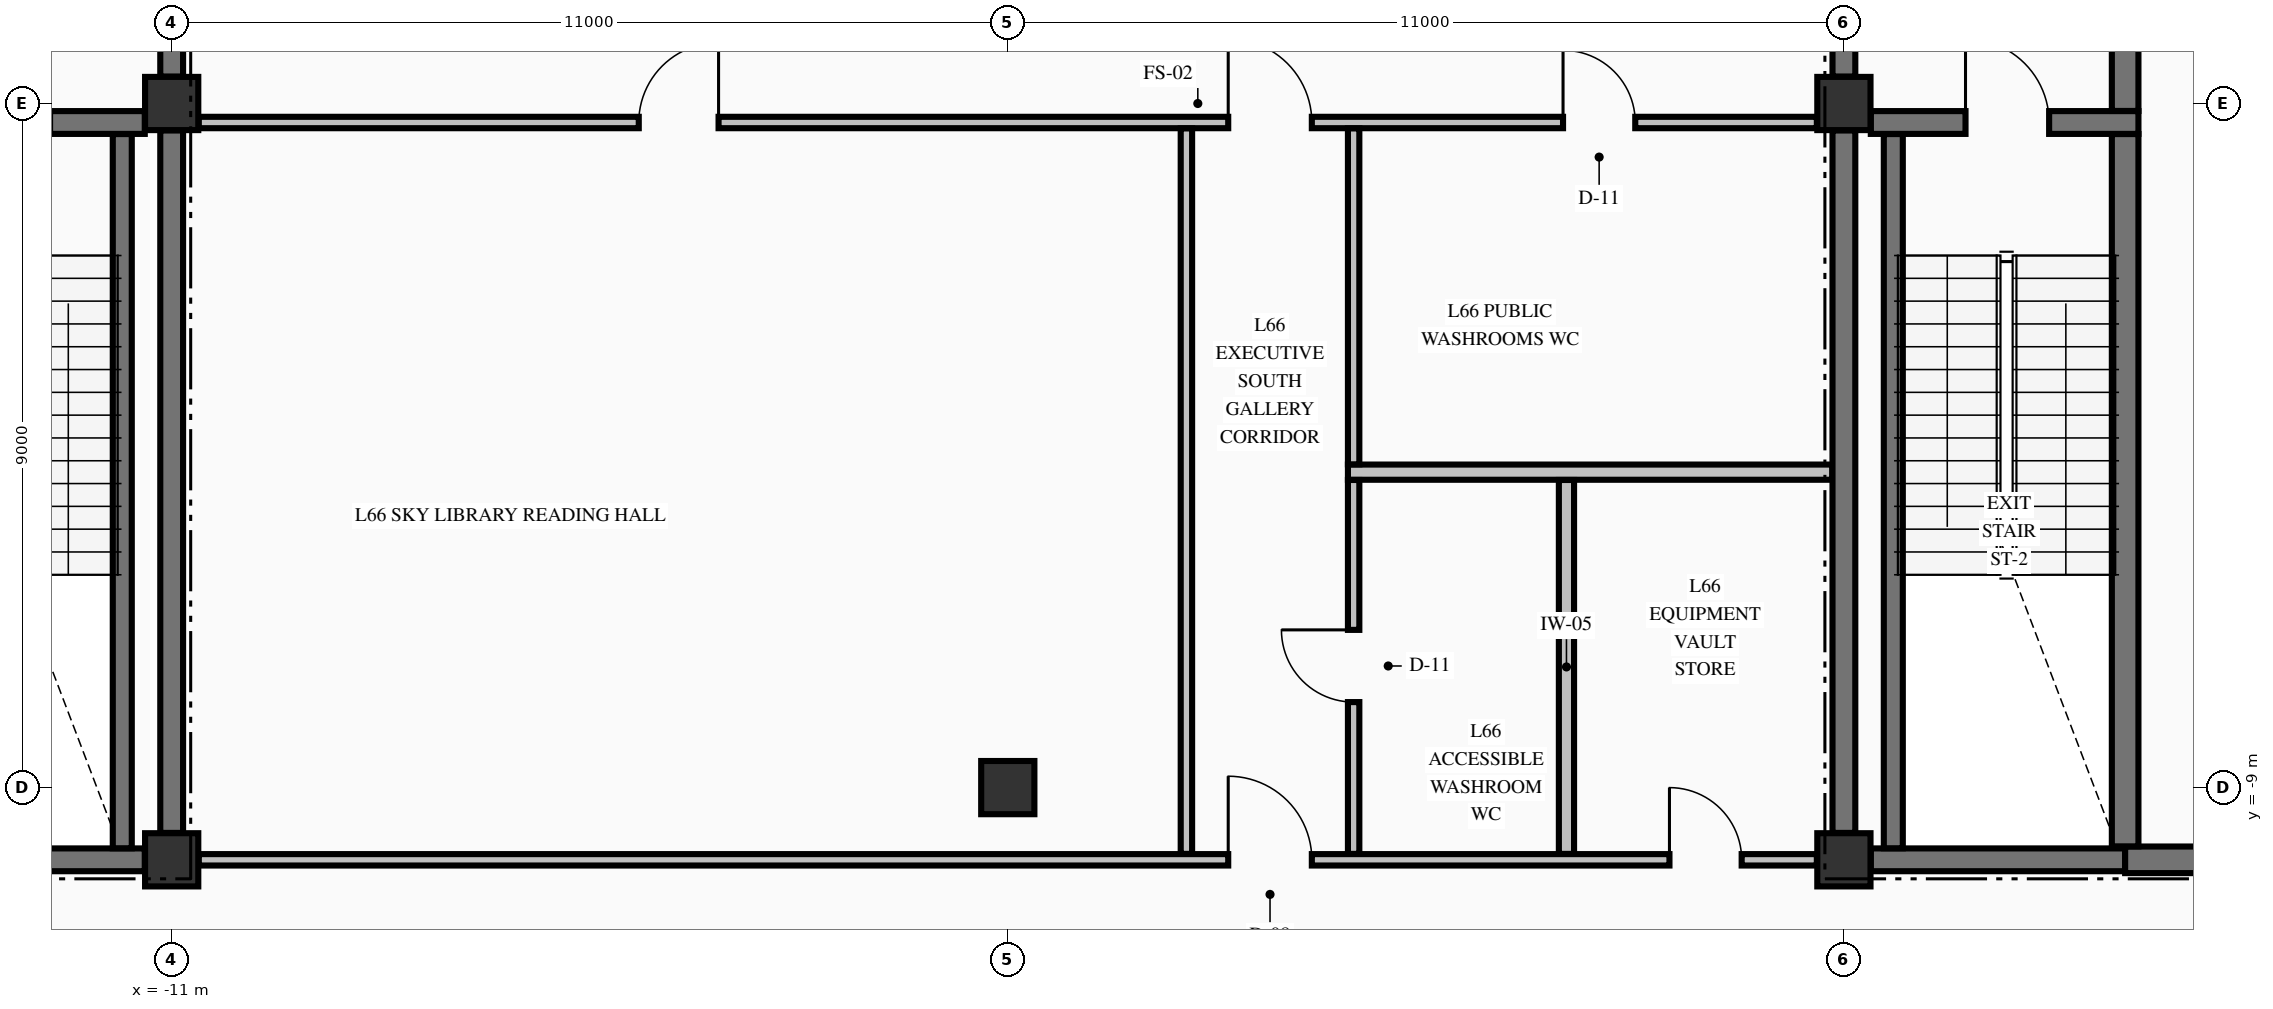
"""IFC4 building model, lengths in metres.
Left out: names, types, materials, properties, quantities, classifications, styles, units other than length and angle.
Written with IfcOpenShell. Run it as: python <this file> out.ifc"""

import sys

from ifc_helpers import new_model, si_unit, direction, frame, frame_2d, origin, origin_2d, place, context, subcontext, project, spatial, rectangle, extrude, element, fill, save


model = new_model("IFC4")
c1 = context("Model", 3, precision=1e-05, world=origin(), true_north=direction((0.0, 1.0)))
c2 = subcontext(c1, "Body", "Model", "MODEL_VIEW")
j1 = project(units=[si_unit("LENGTHUNIT", "METRE"), si_unit("PLANEANGLEUNIT", "RADIAN")], contexts=[c1])
p1 = place(None, origin())
s1 = spatial("IfcSite", under=j1, at=p1, CompositionType="ELEMENT")
p2 = place(p1, origin())
s2 = spatial("IfcBuilding", under=s1, at=p2, CompositionType="ELEMENT")
p3 = place(p2, frame((0.0, 0.0, 249.43)))
s3 = spatial("IfcBuildingStorey", under=s2, at=p3, CompositionType="ELEMENT", Elevation=249.43)
for number, where, z_axis, x_axis in (
    (1, (-11.0, -9.95, -0.425), (0.0, 0.0, 1.0), (1.0, 0.0, 0.0)),
    (2, (-11.0, 0.0, -0.425), (0.0, 0.0, 1.0), (1.0, 0.0, 0.0)),
    (3, (11.0, -9.95, -0.425), (0.0, 0.0, 1.0), (1.0, 0.0, 0.0)),
    (4, (11.0, 0.0, -0.425), (0.0, 0.0, 1.0), (1.0, 0.0, 0.0)),
    (5, (0.0, -9.0, -0.425), (0.0, 0.0, 1.0), (1.0, 0.0, 0.0)),
):
    element("IfcColumn", number, at=place(p3, frame(where, z_axis=z_axis, x_axis=x_axis)), inside=s3, PredefinedType="COLUMN", context=c2, shape_type="SweptSolid", body=[
        extrude(rectangle(XDim=0.7, YDim=0.7, at=origin_2d()), origin(), (0.0, 0.0, 1.0), 5.0),
    ])
for number, where, z_axis, x_axis in (
    (6, (-14.7, -9.95, 0.0), (0.0, 0.0, 1.0), (1.0, 0.0, 0.0)),
    (7, (11.354, -9.95, 0.0), (0.0, 0.0, 1.0), (1.0, 0.0, 0.0)),
):
    element("IfcWall", number, at=place(p3, frame(where, z_axis=z_axis, x_axis=x_axis)), inside=s3, PredefinedType="SHEAR", context=c2, shape_type="SweptSolid", body=[
        extrude(rectangle(XDim=3.346, YDim=0.3, at=frame_2d((1.673, 0.0))), origin(), (0.0, 0.0, 1.0), 4.575),
    ])
p4 = place(p3, frame((14.7, -9.95, 0.0), z_axis=(0.0, 0.0, 1.0), x_axis=(1.0, 0.0, 0.0)))
e8 = element("IfcWall", 8, at=p4, inside=s3, PredefinedType="SHEAR", context=c2, shape_type="SweptSolid", body=[
    extrude(rectangle(XDim=4.946, YDim=0.35, at=frame_2d((2.473, 0.0))), origin(), (0.0, 0.0, 1.0), 4.575),
])
p5 = place(p4, frame((2.125, 0.0, 0.0)))
e9 = element("IfcOpeningElement", 9, at=p5, cuts=e8, PredefinedType="OPENING", context=c2, shape_type="SweptSolid", body=[
    extrude(rectangle(XDim=1.05, YDim=2.15, at=frame_2d((0.525, 1.075))), frame((0.0, 0.185, 0.0), z_axis=(0.0, -1.0, 0.0), x_axis=(1.0, 0.0, 0.0)), (0.0, 0.0, 1.0), 0.37),
])
p6 = place(p3, frame((-20.571, -0.25, 0.0), z_axis=(0.0, 0.0, 1.0), x_axis=(1.0, 0.0, 0.0)))
e10 = element("IfcWall", 10, at=p6, inside=s3, PredefinedType="SHEAR", context=c2, shape_type="SweptSolid", body=[
    extrude(rectangle(XDim=9.217, YDim=0.3, at=frame_2d((4.608, 0.0))), origin(), (0.0, 0.0, 1.0), 4.575),
])
p7 = place(p6, frame((6.871, 0.0, 0.0)))
e11 = element("IfcOpeningElement", 11, at=p7, cuts=e10, PredefinedType="OPENING", context=c2, shape_type="SweptSolid", body=[
    extrude(rectangle(XDim=1.1, YDim=2.15, at=frame_2d((0.55, 1.075))), frame((0.0, 0.16, 0.0), z_axis=(0.0, -1.0, 0.0), x_axis=(1.0, 0.0, 0.0)), (0.0, 0.0, 1.0), 0.32),
])
p8 = place(p3, frame((11.354, -0.25, 0.0), z_axis=(0.0, 0.0, 1.0), x_axis=(1.0, 0.0, 0.0)))
e12 = element("IfcWall", 12, at=p8, inside=s3, PredefinedType="SHEAR", context=c2, shape_type="SweptSolid", body=[
    extrude(rectangle(XDim=3.521, YDim=0.3, at=frame_2d((1.76, 0.0))), origin(), (0.0, 0.0, 1.0), 4.575),
])
p9 = place(p8, frame((1.246, 0.0, 0.0)))
e13 = element("IfcOpeningElement", 13, at=p9, cuts=e12, PredefinedType="OPENING", context=c2, shape_type="SweptSolid", body=[
    extrude(rectangle(XDim=1.1, YDim=2.15, at=frame_2d((0.55, 1.075))), frame((0.0, 0.16, 0.0), z_axis=(0.0, -1.0, 0.0), x_axis=(1.0, 0.0, 0.0)), (0.0, 0.0, 1.0), 0.32),
])
p10 = place(p3, frame((-10.644, -9.95, 0.0), z_axis=(0.0, 0.0, 1.0), x_axis=(1.0, 0.0, 0.0)))
e14 = element("IfcWall", 14, at=p10, inside=s3, PredefinedType="PARTITIONING", context=c2, shape_type="SweptSolid", body=[
    extrude(rectangle(XDim=21.288, YDim=0.15, at=frame_2d((10.644, 0.0))), origin(), (0.0, 0.0, 1.0), 4.575),
])
p11 = place(p10, frame((13.544, 0.0, 0.0)))
e15 = element("IfcOpeningElement", 15, at=p11, cuts=e14, PredefinedType="OPENING", context=c2, shape_type="SweptSolid", body=[
    extrude(rectangle(XDim=1.1, YDim=2.15, at=frame_2d((0.55, 1.075))), frame((0.0, 0.085, 0.0), z_axis=(0.0, -1.0, 0.0), x_axis=(1.0, 0.0, 0.0)), (0.0, 0.0, 1.0), 0.17),
])
p12 = place(p10, frame((19.349, 0.0, 0.0)))
e16 = element("IfcOpeningElement", 16, at=p12, cuts=e14, PredefinedType="OPENING", context=c2, shape_type="SweptSolid", body=[
    extrude(rectangle(XDim=0.95, YDim=2.15, at=frame_2d((0.475, 1.075))), frame((0.0, 0.085, 0.0), z_axis=(0.0, -1.0, 0.0), x_axis=(1.0, 0.0, 0.0)), (0.0, 0.0, 1.0), 0.17),
])
p13 = place(p3, frame((4.475, -4.85, 0.0), z_axis=(0.0, 0.0, 1.0), x_axis=(1.0, 0.0, 0.0)))
e17 = element("IfcWall", 17, at=p13, inside=s3, PredefinedType="PARTITIONING", context=c2, shape_type="SweptSolid", body=[
    extrude(rectangle(XDim=6.372, YDim=0.2, at=frame_2d((3.186, 0.0))), origin(), (0.0, 0.0, 1.0), 4.575),
])
p14 = place(p3, frame((-10.644, -0.25, 0.0), z_axis=(0.0, 0.0, 1.0), x_axis=(1.0, 0.0, 0.0)))
e18 = element("IfcWall", 18, at=p14, inside=s3, PredefinedType="PARTITIONING", context=c2, shape_type="SweptSolid", body=[
    extrude(rectangle(XDim=21.288, YDim=0.15, at=frame_2d((10.644, 0.0))), origin(), (0.0, 0.0, 1.0), 4.575),
])
p15 = place(p14, frame((13.544, 0.0, 0.0)))
e19 = element("IfcOpeningElement", 19, at=p15, cuts=e18, PredefinedType="OPENING", context=c2, shape_type="SweptSolid", body=[
    extrude(rectangle(XDim=1.1, YDim=2.15, at=frame_2d((0.55, 1.075))), frame((0.0, 0.085, 0.0), z_axis=(0.0, -1.0, 0.0), x_axis=(1.0, 0.0, 0.0)), (0.0, 0.0, 1.0), 0.17),
])
p16 = place(p14, frame((5.789, 0.0, 0.0)))
e20 = element("IfcOpeningElement", 20, at=p16, cuts=e18, PredefinedType="OPENING", context=c2, shape_type="SweptSolid", body=[
    extrude(rectangle(XDim=1.05, YDim=2.15, at=frame_2d((0.525, 1.075))), frame((0.0, 0.085, 0.0), z_axis=(0.0, -1.0, 0.0), x_axis=(1.0, 0.0, 0.0)), (0.0, 0.0, 1.0), 0.17),
])
p17 = place(p14, frame((17.949, 0.0, 0.0)))
e21 = element("IfcOpeningElement", 21, at=p17, cuts=e18, PredefinedType="OPENING", context=c2, shape_type="SweptSolid", body=[
    extrude(rectangle(XDim=0.95, YDim=2.15, at=frame_2d((0.475, 1.075))), frame((0.0, 0.085, 0.0), z_axis=(0.0, -1.0, 0.0), x_axis=(1.0, 0.0, 0.0)), (0.0, 0.0, 1.0), 0.17),
])
p18 = place(p3, frame((-11.65, -9.798, 0.0), z_axis=(0.0, 0.0, 1.0), x_axis=(0.0, 1.0, 0.0)))
e22 = element("IfcWall", 22, at=p18, inside=s3, PredefinedType="SOLIDWALL", context=c2, shape_type="SweptSolid", body=[
    extrude(rectangle(XDim=9.396, YDim=0.25, at=frame_2d((4.698, 0.0))), origin(), (0.0, 0.0, 1.0), 4.575),
])
p19 = place(p3, frame((-11.0, -9.596, 0.0), z_axis=(0.0, 0.0, 1.0), x_axis=(0.0, 1.0, 0.0)))
e23 = element("IfcWall", 23, at=p19, inside=s3, PredefinedType="SHEAR", context=c2, shape_type="SweptSolid", body=[
    extrude(rectangle(XDim=9.242, YDim=0.3, at=frame_2d((4.621, 0.0))), origin(), (0.0, 0.0, 1.0), 4.575),
])
p20 = place(p3, frame((-11.0, 0.354, 0.0), z_axis=(0.0, 0.0, 1.0), x_axis=(0.0, 1.0, 0.0)))
e24 = element("IfcWall", 24, at=p20, inside=s3, PredefinedType="SHEAR", context=c2, shape_type="SweptSolid", body=[
    extrude(rectangle(XDim=2.394, YDim=0.3, at=frame_2d((1.197, 0.0))), origin(), (0.0, 0.0, 1.0), 4.575),
])
p21 = place(p20, frame((0.746, 0.0, 0.0)))
e25 = element("IfcOpeningElement", 25, at=p21, cuts=e24, PredefinedType="OPENING", context=c2, shape_type="SweptSolid", body=[
    extrude(rectangle(XDim=1.1, YDim=2.15, at=frame_2d((0.55, 1.075))), frame((0.0, 0.16, 0.0), z_axis=(0.0, -1.0, 0.0), x_axis=(1.0, 0.0, 0.0)), (0.0, 0.0, 1.0), 0.32),
])
p22 = place(p3, frame((11.0, -9.596, 0.0), z_axis=(0.0, 0.0, 1.0), x_axis=(0.0, 1.0, 0.0)))
e26 = element("IfcWall", 26, at=p22, inside=s3, PredefinedType="SHEAR", context=c2, shape_type="SweptSolid", body=[
    extrude(rectangle(XDim=9.242, YDim=0.3, at=frame_2d((4.621, 0.0))), origin(), (0.0, 0.0, 1.0), 4.575),
])
p23 = place(p3, frame((11.0, 0.354, 0.0), z_axis=(0.0, 0.0, 1.0), x_axis=(0.0, 1.0, 0.0)))
e27 = element("IfcWall", 27, at=p23, inside=s3, PredefinedType="SHEAR", context=c2, shape_type="SweptSolid", body=[
    extrude(rectangle(XDim=2.394, YDim=0.3, at=frame_2d((1.197, 0.0))), origin(), (0.0, 0.0, 1.0), 4.575),
])
p24 = place(p23, frame((0.746, 0.0, 0.0)))
e28 = element("IfcOpeningElement", 28, at=p24, cuts=e27, PredefinedType="OPENING", context=c2, shape_type="SweptSolid", body=[
    extrude(rectangle(XDim=1.1, YDim=2.15, at=frame_2d((0.55, 1.075))), frame((0.0, 0.16, 0.0), z_axis=(0.0, -1.0, 0.0), x_axis=(1.0, 0.0, 0.0)), (0.0, 0.0, 1.0), 0.32),
])
p25 = place(p3, frame((11.65, -9.798, 0.0), z_axis=(0.0, 0.0, 1.0), x_axis=(0.0, 1.0, 0.0)))
e29 = element("IfcWall", 29, at=p25, inside=s3, PredefinedType="SOLIDWALL", context=c2, shape_type="SweptSolid", body=[
    extrude(rectangle(XDim=9.396, YDim=0.25, at=frame_2d((4.698, 0.0))), origin(), (0.0, 0.0, 1.0), 4.575),
])
p26 = place(p3, frame((14.7, -9.773, 0.0), z_axis=(0.0, 0.0, 1.0), x_axis=(0.0, 1.0, 0.0)))
e30 = element("IfcWall", 30, at=p26, inside=s3, PredefinedType="SHEAR", context=c2, shape_type="SweptSolid", body=[
    extrude(rectangle(XDim=9.371, YDim=0.35, at=frame_2d((4.686, 0.0))), origin(), (0.0, 0.0, 1.0), 4.575),
])
p27 = place(p3, frame((14.7, -0.098, 0.0), z_axis=(0.0, 0.0, 1.0), x_axis=(0.0, 1.0, 0.0)))
e31 = element("IfcWall", 31, at=p27, inside=s3, PredefinedType="SHEAR", context=c2, shape_type="SweptSolid", body=[
    extrude(rectangle(XDim=2.846, YDim=0.35, at=frame_2d((1.423, 0.0))), origin(), (0.0, 0.0, 1.0), 4.575),
])
p28 = place(p3, frame((2.35, -9.872, 0.0), z_axis=(0.0, 0.0, 1.0), x_axis=(0.0, 1.0, 0.0)))
e32 = element("IfcWall", 32, at=p28, inside=s3, PredefinedType="PARTITIONING", context=c2, shape_type="SweptSolid", body=[
    extrude(rectangle(XDim=9.544, YDim=0.15, at=frame_2d((4.772, 0.0))), origin(), (0.0, 0.0, 1.0), 4.575),
])
p29 = place(p3, frame((4.55, -9.872, 0.0), z_axis=(0.0, 0.0, 1.0), x_axis=(0.0, 1.0, 0.0)))
e33 = element("IfcWall", 33, at=p29, inside=s3, PredefinedType="PARTITIONING", context=c2, shape_type="SweptSolid", body=[
    extrude(rectangle(XDim=4.919, YDim=0.15, at=frame_2d((2.459, 0.0))), origin(), (0.0, 0.0, 1.0), 4.575),
])
p30 = place(p29, frame((1.997, 0.0, 0.0)))
e34 = element("IfcOpeningElement", 34, at=p30, cuts=e33, PredefinedType="OPENING", context=c2, shape_type="SweptSolid", body=[
    extrude(rectangle(XDim=0.95, YDim=2.15, at=frame_2d((0.475, 1.075))), frame((0.0, 0.085, 0.0), z_axis=(0.0, -1.0, 0.0), x_axis=(1.0, 0.0, 0.0)), (0.0, 0.0, 1.0), 0.17),
])
p31 = place(p3, frame((4.55, -4.747, 0.0), z_axis=(0.0, 0.0, 1.0), x_axis=(0.0, 1.0, 0.0)))
e35 = element("IfcWall", 35, at=p31, inside=s3, PredefinedType="PARTITIONING", context=c2, shape_type="SweptSolid", body=[
    extrude(rectangle(XDim=4.419, YDim=0.15, at=frame_2d((2.209, 0.0))), origin(), (0.0, 0.0, 1.0), 4.575),
])
p32 = place(p3, frame((7.35, -9.872, 0.0), z_axis=(0.0, 0.0, 1.0), x_axis=(0.0, 1.0, 0.0)))
e36 = element("IfcWall", 36, at=p32, inside=s3, PredefinedType="PARTITIONING", context=c2, shape_type="SweptSolid", body=[
    extrude(rectangle(XDim=4.919, YDim=0.2, at=frame_2d((2.459, 0.0))), origin(), (0.0, 0.0, 1.0), 4.575),
])
p33 = place(p9, origin())
e37 = element("IfcDoor", 37, at=p33, inside=s3, OperationType="SINGLE_SWING_LEFT", PredefinedType="DOOR", context=c2, shape_type="SweptSolid", body=[
    extrude(rectangle(XDim=1.1, YDim=2.15, at=frame_2d((0.55, 1.075))), frame((0.0, 0.025, 0.0), z_axis=(0.0, -1.0, 0.0), x_axis=(1.0, 0.0, 0.0)), (0.0, 0.0, 1.0), 0.05),
])
fill(e13, e37)
p34 = place(p11, origin())
e38 = element("IfcDoor", 38, at=p34, inside=s3, OperationType="SINGLE_SWING_LEFT", PredefinedType="DOOR", context=c2, shape_type="SweptSolid", body=[
    extrude(rectangle(XDim=1.1, YDim=2.15, at=frame_2d((0.55, 1.075))), frame((0.0, 0.025, 0.0), z_axis=(0.0, -1.0, 0.0), x_axis=(1.0, 0.0, 0.0)), (0.0, 0.0, 1.0), 0.05),
])
fill(e15, e38)
p35 = place(p15, origin())
e39 = element("IfcDoor", 39, at=p35, inside=s3, OperationType="SINGLE_SWING_LEFT", PredefinedType="DOOR", context=c2, shape_type="SweptSolid", body=[
    extrude(rectangle(XDim=1.1, YDim=2.15, at=frame_2d((0.55, 1.075))), frame((0.0, 0.025, 0.0), z_axis=(0.0, -1.0, 0.0), x_axis=(1.0, 0.0, 0.0)), (0.0, 0.0, 1.0), 0.05),
])
fill(e19, e39)
p36 = place(p16, origin())
e40 = element("IfcDoor", 40, at=p36, inside=s3, OperationType="SINGLE_SWING_RIGHT", PredefinedType="DOOR", context=c2, shape_type="SweptSolid", body=[
    extrude(rectangle(XDim=1.05, YDim=2.15, at=frame_2d((0.525, 1.075))), frame((0.0, 0.025, 0.0), z_axis=(0.0, -1.0, 0.0), x_axis=(1.0, 0.0, 0.0)), (0.0, 0.0, 1.0), 0.05),
])
fill(e20, e40)
p37 = place(p17, origin())
e41 = element("IfcDoor", 41, at=p37, inside=s3, OperationType="SINGLE_SWING_LEFT", PredefinedType="DOOR", context=c2, shape_type="SweptSolid", body=[
    extrude(rectangle(XDim=0.95, YDim=2.15, at=frame_2d((0.475, 1.075))), frame((0.0, 0.025, 0.0), z_axis=(0.0, -1.0, 0.0), x_axis=(1.0, 0.0, 0.0)), (0.0, 0.0, 1.0), 0.05),
])
fill(e21, e41)
p38 = place(p30, origin())
e42 = element("IfcDoor", 42, at=p38, inside=s3, OperationType="SINGLE_SWING_RIGHT", PredefinedType="DOOR", context=c2, shape_type="SweptSolid", body=[
    extrude(rectangle(XDim=0.95, YDim=2.15, at=frame_2d((0.475, 1.075))), frame((0.0, 0.025, 0.0), z_axis=(0.0, -1.0, 0.0), x_axis=(1.0, 0.0, 0.0)), (0.0, 0.0, 1.0), 0.05),
])
fill(e34, e42)
p39 = place(p12, origin())
e43 = element("IfcDoor", 43, at=p39, inside=s3, OperationType="SINGLE_SWING_LEFT", PredefinedType="DOOR", context=c2, shape_type="SweptSolid", body=[
    extrude(rectangle(XDim=0.95, YDim=2.15, at=frame_2d((0.475, 1.075))), frame((0.0, 0.025, 0.0), z_axis=(0.0, -1.0, 0.0), x_axis=(1.0, 0.0, 0.0)), (0.0, 0.0, 1.0), 0.05),
])
fill(e16, e43)
save(model, sys.argv[1])
